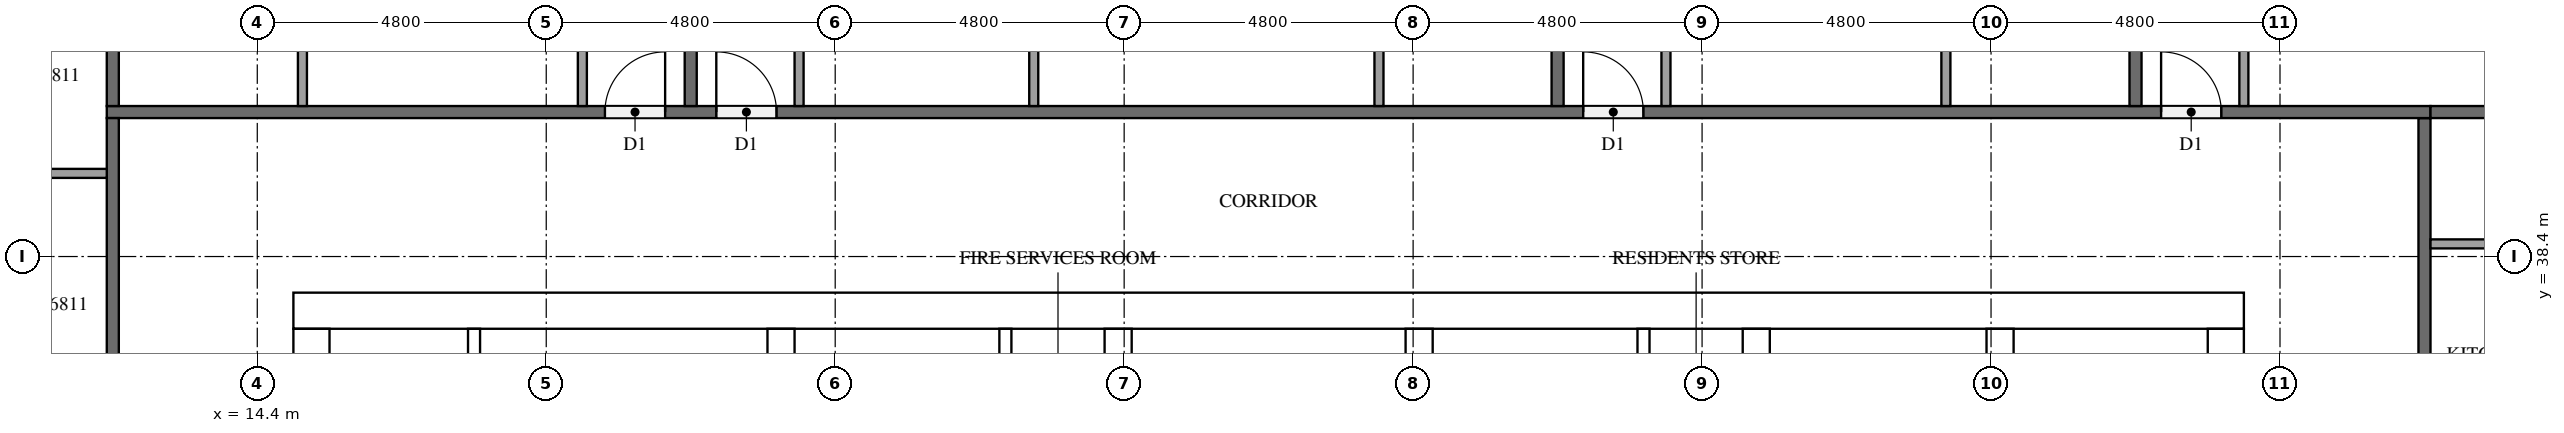
"""IFC4 building model, lengths in metres.
Left out: names, types, materials, properties, quantities, classifications, styles, units other than length and angle.
Written with IfcOpenShell. Run it as: python <this file> out.ifc"""

import sys

from ifc_helpers import new_model, si_unit, direction, frame, frame_2d, origin, place, context, subcontext, project, spatial, rectangle, extrude, element, fill, save


model = new_model("IFC4")
c1 = context("Model", 3, precision=1e-05, world=origin(), true_north=direction((0.0, 1.0)))
c2 = subcontext(c1, "Body", "Model", "MODEL_VIEW")
j1 = project(units=[si_unit("LENGTHUNIT", "METRE"), si_unit("PLANEANGLEUNIT", "RADIAN")], contexts=[c1])
p1 = place(None, origin())
s1 = spatial("IfcSite", under=j1, at=p1, CompositionType="ELEMENT")
p2 = place(p1, origin())
s2 = spatial("IfcBuilding", under=s1, at=p2, CompositionType="ELEMENT")
p3 = place(p2, frame((0.0, 0.0, 259.7)))
s3 = spatial("IfcBuildingStorey", under=s2, at=p3, CompositionType="ELEMENT", Elevation=259.7)
p4 = place(p3, frame((15.0, 37.5, 0.0), z_axis=(0.0, 0.0, 1.0), x_axis=(1.0, 0.0, 0.0)))
e1 = element("IfcWall", 1, at=p4, inside=s3, PredefinedType="SHEAR", context=c2, shape_type="SweptSolid", body=[
    extrude(rectangle(XDim=32.4, YDim=0.6, at=frame_2d((16.2, 0.0))), origin(), (0.0, 0.0, 1.0), 3.1),
])
p5 = place(p4, frame((15.3, 0.0, 0.0)))
e2 = element("IfcOpeningElement", 2, at=p5, cuts=e1, PredefinedType="OPENING", context=c2, shape_type="SweptSolid", body=[
    extrude(rectangle(XDim=1.8, YDim=2.1, at=frame_2d((0.9, 1.05))), frame((0.0, 0.31, 0.0), z_axis=(0.0, -1.0, 0.0), x_axis=(1.0, 0.0, 0.0)), (0.0, 0.0, 1.0), 0.62),
])
p6 = place(p4, frame((1.25, 0.0, 0.0)))
e3 = element("IfcOpeningElement", 3, at=p6, cuts=e1, PredefinedType="OPENING", context=c2, shape_type="SweptSolid", body=[
    extrude(rectangle(XDim=1.0, YDim=2.1, at=frame_2d((0.5, 1.05))), frame((0.0, 0.31, 0.0), z_axis=(0.0, -1.0, 0.0), x_axis=(1.0, 0.0, 0.0)), (0.0, 0.0, 1.0), 0.62),
])
p7 = place(p4, frame((4.988, 0.0, 0.0)))
e4 = element("IfcOpeningElement", 4, at=p7, cuts=e1, PredefinedType="OPENING", context=c2, shape_type="SweptSolid", body=[
    extrude(rectangle(XDim=1.0, YDim=2.1, at=frame_2d((0.5, 1.05))), frame((0.0, 0.31, 0.0), z_axis=(0.0, -1.0, 0.0), x_axis=(1.0, 0.0, 0.0)), (0.0, 0.0, 1.0), 0.62),
])
p8 = place(p3, frame((15.3, 15.6, 0.0), z_axis=(0.0, 0.0, 1.0), x_axis=(0.0, 1.0, 0.0)))
e5 = element("IfcWall", 5, at=p8, inside=s3, PredefinedType="SHEAR", context=c2, shape_type="SweptSolid", body=[
    extrude(rectangle(XDim=21.6, YDim=0.6, at=frame_2d((10.8, 0.0))), origin(), (0.0, 0.0, 1.0), 3.1),
])
p9 = place(p8, frame((5.16, 0.0, 0.0)))
e6 = element("IfcOpeningElement", 6, at=p9, cuts=e5, PredefinedType="OPENING", context=c2, shape_type="SweptSolid", body=[
    extrude(rectangle(XDim=1.2, YDim=2.1, at=frame_2d((0.6, 1.05))), frame((0.0, 0.31, 0.0), z_axis=(0.0, -1.0, 0.0), x_axis=(1.0, 0.0, 0.0)), (0.0, 0.0, 1.0), 0.62),
])
p10 = place(p3, frame((47.1, 15.6, 0.0), z_axis=(0.0, 0.0, 1.0), x_axis=(0.0, 1.0, 0.0)))
e7 = element("IfcWall", 7, at=p10, inside=s3, PredefinedType="SHEAR", context=c2, shape_type="SweptSolid", body=[
    extrude(rectangle(XDim=21.6, YDim=0.6, at=frame_2d((10.8, 0.0))), origin(), (0.0, 0.0, 1.0), 3.1),
])
p11 = place(p10, frame((10.5, 0.0, 0.0)))
e8 = element("IfcOpeningElement", 8, at=p11, cuts=e7, PredefinedType="OPENING", context=c2, shape_type="SweptSolid", body=[
    extrude(rectangle(XDim=1.2, YDim=2.1, at=frame_2d((0.6, 1.05))), frame((0.0, 0.31, 0.0), z_axis=(0.0, -1.0, 0.0), x_axis=(1.0, 0.0, 0.0)), (0.0, 0.0, 1.0), 0.62),
])
p12 = place(p3, frame((23.1, 15.6, 0.0), z_axis=(0.0, 0.0, 1.0), x_axis=(0.0, 1.0, 0.0)))
e9 = element("IfcWall", 9, at=p12, inside=s3, PredefinedType="SHEAR", context=c2, shape_type="SweptSolid", body=[
    extrude(rectangle(XDim=21.6, YDim=0.45, at=frame_2d((10.8, 0.0))), origin(), (0.0, 0.0, 1.0), 3.1),
])
p13 = place(p3, frame((39.3, 27.75, 0.0), z_axis=(0.0, 0.0, 1.0), x_axis=(0.0, 1.0, 0.0)))
e10 = element("IfcWall", 10, at=p13, inside=s3, PredefinedType="SHEAR", context=c2, shape_type="SweptSolid", body=[
    extrude(rectangle(XDim=9.45, YDim=0.45, at=frame_2d((4.725, 0.0))), origin(), (0.0, 0.0, 1.0), 3.1),
])
p14 = place(p3, frame((43.35, 27.75, 0.0), z_axis=(0.0, 0.0, 1.0), x_axis=(0.0, 1.0, 0.0)))
e11 = element("IfcWall", 11, at=p14, inside=s3, PredefinedType="SHEAR", context=c2, shape_type="SweptSolid", body=[
    extrude(rectangle(XDim=9.45, YDim=0.45, at=frame_2d((4.725, 0.0))), origin(), (0.0, 0.0, 1.0), 3.1),
])
p15 = place(p14, frame((7.65, 0.0, 0.0)))
e12 = element("IfcOpeningElement", 12, at=p15, cuts=e11, PredefinedType="OPENING", context=c2, shape_type="SweptSolid", body=[
    extrude(rectangle(XDim=1.2, YDim=2.1, at=frame_2d((0.6, 1.05))), frame((0.0, 0.235, 0.0), z_axis=(0.0, -1.0, 0.0), x_axis=(1.0, 0.0, 0.0)), (0.0, 0.0, 1.0), 0.47),
])
for number, where, z_axis, x_axis in (
    (13, (28.7, 33.775, 0.0), (0.0, 0.0, 1.0), (0.0, 1.0, 0.0)),
    (14, (33.7, 33.775, 0.0), (0.0, 0.0, 1.0), (0.0, 1.0, 0.0)),
):
    element("IfcWall", number, at=place(p3, frame(where, z_axis=z_axis, x_axis=x_axis)), inside=s3, PredefinedType="SHEAR", context=c2, shape_type="SweptSolid", body=[
        extrude(rectangle(XDim=3.425, YDim=0.45, at=frame_2d((1.712, 0.0))), origin(), (0.0, 0.0, 1.0), 3.1),
    ])
p16 = place(p3, frame((18.001, 31.475, 0.0), z_axis=(0.0, 0.0, 1.0), x_axis=(0.0, 1.0, 0.0)))
e15 = element("IfcWall", 15, at=p16, inside=s3, PredefinedType="PARTITIONING", context=c2, shape_type="SweptSolid", body=[
    extrude(rectangle(XDim=5.725, YDim=0.2, at=frame_2d((2.862, 0.0))), origin(), (0.0, 0.0, 1.0), 3.1),
])
for number, where, z_axis, x_axis in (
    (16, (26.827, 33.775, 0.0), (0.0, 0.0, 1.0), (0.0, 1.0, 0.0)),
    (17, (37.427, 33.775, 0.0), (0.0, 0.0, 1.0), (0.0, 1.0, 0.0)),
):
    element("IfcWall", number, at=place(p3, frame(where, z_axis=z_axis, x_axis=x_axis)), inside=s3, PredefinedType="PARTITIONING", context=c2, shape_type="SweptSolid", body=[
        extrude(rectangle(XDim=3.425, YDim=0.2, at=frame_2d((1.712, 0.0))), origin(), (0.0, 0.0, 1.0), 3.1),
    ])
p17 = place(p3, frame((50.4, 40.7, 0.0), z_axis=(0.0, 0.0, 1.0), x_axis=(0.0, -1.0, 0.0)))
e18 = element("IfcWall", 18, at=p17, inside=s3, PredefinedType="PARTITIONING", context=c2, shape_type="SweptSolid", body=[
    extrude(rectangle(XDim=28.6, YDim=0.2, at=frame_2d((14.3, 0.0))), origin(), (0.0, 0.0, 1.0), 3.1),
])
p18 = place(p17, frame((27.275, 0.0, 0.0)))
e19 = element("IfcOpeningElement", 19, at=p18, cuts=e18, PredefinedType="OPENING", context=c2, shape_type="SweptSolid", body=[
    extrude(rectangle(XDim=1.0, YDim=2.1, at=frame_2d((0.5, 1.05))), frame((0.0, 0.11, 0.0), z_axis=(0.0, -1.0, 0.0), x_axis=(1.0, 0.0, 0.0)), (0.0, 0.0, 1.0), 0.22),
])
p19 = place(p17, frame((7.525, 0.0, 0.0)))
e20 = element("IfcOpeningElement", 20, at=p19, cuts=e18, PredefinedType="OPENING", context=c2, shape_type="SweptSolid", body=[
    extrude(rectangle(XDim=1.0, YDim=2.1, at=frame_2d((0.5, 1.05))), frame((0.0, 0.11, 0.0), z_axis=(0.0, -1.0, 0.0), x_axis=(1.0, 0.0, 0.0)), (0.0, 0.0, 1.0), 0.22),
])
p20 = place(p17, frame((5.675, 0.0, 0.0)))
e21 = element("IfcOpeningElement", 21, at=p20, cuts=e18, PredefinedType="OPENING", context=c2, shape_type="SweptSolid", body=[
    extrude(rectangle(XDim=1.0, YDim=2.1, at=frame_2d((0.5, 1.05))), frame((0.0, 0.11, 0.0), z_axis=(0.0, -1.0, 0.0), x_axis=(1.0, 0.0, 0.0)), (0.0, 0.0, 1.0), 0.22),
])
p21 = place(p3, frame((11.9, 40.8, 0.0), z_axis=(0.0, 0.0, 1.0), x_axis=(1.0, 0.0, 0.0)))
e22 = element("IfcWall", 22, at=p21, inside=s3, PredefinedType="PARTITIONING", context=c2, shape_type="SweptSolid", body=[
    extrude(rectangle(XDim=38.6, YDim=0.2, at=frame_2d((19.3, 0.0))), origin(), (0.0, 0.0, 1.0), 3.1),
])
p22 = place(p21, frame((34.125, 0.0, 0.0)))
e23 = element("IfcOpeningElement", 23, at=p22, cuts=e22, PredefinedType="OPENING", context=c2, shape_type="SweptSolid", body=[
    extrude(rectangle(XDim=1.0, YDim=2.1, at=frame_2d((0.5, 1.05))), frame((0.0, 0.11, 0.0), z_axis=(0.0, -1.0, 0.0), x_axis=(1.0, 0.0, 0.0)), (0.0, 0.0, 1.0), 0.22),
])
p23 = place(p21, frame((24.525, 0.0, 0.0)))
e24 = element("IfcOpeningElement", 24, at=p23, cuts=e22, PredefinedType="OPENING", context=c2, shape_type="SweptSolid", body=[
    extrude(rectangle(XDim=1.0, YDim=2.1, at=frame_2d((0.5, 1.05))), frame((0.0, 0.11, 0.0), z_axis=(0.0, -1.0, 0.0), x_axis=(1.0, 0.0, 0.0)), (0.0, 0.0, 1.0), 0.22),
])
p24 = place(p21, frame((10.125, 0.0, 0.0)))
e25 = element("IfcOpeningElement", 25, at=p24, cuts=e22, PredefinedType="OPENING", context=c2, shape_type="SweptSolid", body=[
    extrude(rectangle(XDim=1.0, YDim=2.1, at=frame_2d((0.5, 1.05))), frame((0.0, 0.11, 0.0), z_axis=(0.0, -1.0, 0.0), x_axis=(1.0, 0.0, 0.0)), (0.0, 0.0, 1.0), 0.22),
])
p25 = place(p21, frame((8.275, 0.0, 0.0)))
e26 = element("IfcOpeningElement", 26, at=p25, cuts=e22, PredefinedType="OPENING", context=c2, shape_type="SweptSolid", body=[
    extrude(rectangle(XDim=1.0, YDim=2.1, at=frame_2d((0.5, 1.05))), frame((0.0, 0.11, 0.0), z_axis=(0.0, -1.0, 0.0), x_axis=(1.0, 0.0, 0.0)), (0.0, 0.0, 1.0), 0.22),
])
p26 = place(p3, frame((12.0, 12.1, 0.0), z_axis=(0.0, 0.0, 1.0), x_axis=(0.0, 1.0, 0.0)))
e27 = element("IfcWall", 27, at=p26, inside=s3, PredefinedType="PARTITIONING", context=c2, shape_type="SweptSolid", body=[
    extrude(rectangle(XDim=28.6, YDim=0.2, at=frame_2d((14.3, 0.0))), origin(), (0.0, 0.0, 1.0), 3.1),
])
p27 = place(p26, frame((21.875, 0.0, 0.0)))
e28 = element("IfcOpeningElement", 28, at=p27, cuts=e27, PredefinedType="OPENING", context=c2, shape_type="SweptSolid", body=[
    extrude(rectangle(XDim=1.1, YDim=2.1, at=frame_2d((0.55, 1.05))), frame((0.0, 0.11, 0.0), z_axis=(0.0, -1.0, 0.0), x_axis=(1.0, 0.0, 0.0)), (0.0, 0.0, 1.0), 0.22),
])
p28 = place(p26, frame((20.075, 0.0, 0.0)))
e29 = element("IfcOpeningElement", 29, at=p28, cuts=e27, PredefinedType="OPENING", context=c2, shape_type="SweptSolid", body=[
    extrude(rectangle(XDim=1.0, YDim=2.1, at=frame_2d((0.5, 1.05))), frame((0.0, 0.11, 0.0), z_axis=(0.0, -1.0, 0.0), x_axis=(1.0, 0.0, 0.0)), (0.0, 0.0, 1.0), 0.22),
])
p29 = place(p26, frame((5.675, 0.0, 0.0)))
e30 = element("IfcOpeningElement", 30, at=p29, cuts=e27, PredefinedType="OPENING", context=c2, shape_type="SweptSolid", body=[
    extrude(rectangle(XDim=1.0, YDim=2.1, at=frame_2d((0.5, 1.05))), frame((0.0, 0.11, 0.0), z_axis=(0.0, -1.0, 0.0), x_axis=(1.0, 0.0, 0.0)), (0.0, 0.0, 1.0), 0.22),
])
p30 = place(p3, frame((50.5, 40.8, 0.0), z_axis=(0.0, 0.0, 1.0), x_axis=(1.0, 0.0, 0.0)))
e31 = element("IfcWall", 31, at=p30, inside=s3, PredefinedType="PARTITIONING", context=c2, shape_type="SweptSolid", body=[
    extrude(rectangle(XDim=7.0, YDim=0.2, at=frame_2d((3.5, 0.0))), origin(), (0.0, 0.0, 1.0), 3.1),
])
for number, where, z_axis, x_axis in (
    (32, (45.6, 52.7, 0.0), (0.0, 0.0, 1.0), (0.0, -1.0, 0.0)),
    (33, (36.0, 52.7, 0.0), (0.0, 0.0, 1.0), (0.0, -1.0, 0.0)),
    (34, (21.6, 52.7, 0.0), (0.0, 0.0, 1.0), (0.0, -1.0, 0.0)),
    (35, (12.0, 52.7, 0.0), (0.0, 0.0, 1.0), (0.0, -1.0, 0.0)),
):
    element("IfcWall", number, at=place(p3, frame(where, z_axis=z_axis, x_axis=x_axis)), inside=s3, PredefinedType="PARTITIONING", context=c2, shape_type="SweptSolid", body=[
        extrude(rectangle(XDim=11.8, YDim=0.2, at=frame_2d((5.9, 0.0))), origin(), (0.0, 0.0, 1.0), 3.1),
    ])
p31 = place(p3, frame((50.5, 38.61, 0.0), z_axis=(0.0, 0.0, 1.0), x_axis=(1.0, 0.0, 0.0)))
e36 = element("IfcWall", 36, at=p31, inside=s3, PredefinedType="PARTITIONING", context=c2, shape_type="SweptSolid", body=[
    extrude(rectangle(XDim=2.075, YDim=0.15, at=frame_2d((1.038, 0.0))), origin(), (0.0, 0.0, 1.0), 3.1),
])
p32 = place(p3, frame((47.4, 40.9, 0.0), z_axis=(0.0, 0.0, 1.0), x_axis=(0.0, 1.0, 0.0)))
e37 = element("IfcWall", 37, at=p32, inside=s3, PredefinedType="PARTITIONING", context=c2, shape_type="SweptSolid", body=[
    extrude(rectangle(XDim=4.325, YDim=0.15, at=frame_2d((2.163, 0.0))), origin(), (0.0, 0.0, 1.0), 3.1),
])
p33 = place(p3, frame((42.45, 40.9, 0.0), z_axis=(0.0, 0.0, 1.0), x_axis=(0.0, 1.0, 0.0)))
e38 = element("IfcWall", 38, at=p33, inside=s3, PredefinedType="PARTITIONING", context=c2, shape_type="SweptSolid", body=[
    extrude(rectangle(XDim=3.575, YDim=0.15, at=frame_2d((1.788, 0.0))), origin(), (0.0, 0.0, 1.0), 3.1),
])
p34 = place(p3, frame((37.8, 40.9, 0.0), z_axis=(0.0, 0.0, 1.0), x_axis=(0.0, 1.0, 0.0)))
e39 = element("IfcWall", 39, at=p34, inside=s3, PredefinedType="PARTITIONING", context=c2, shape_type="SweptSolid", body=[
    extrude(rectangle(XDim=3.725, YDim=0.15, at=frame_2d((1.863, 0.0))), origin(), (0.0, 0.0, 1.0), 3.1),
])
for number, where, z_axis, x_axis in (
    (40, (27.298, 40.9, 0.0), (0.0, 0.0, 1.0), (0.0, 1.0, 0.0)),
    (41, (33.033, 40.9, 0.0), (0.0, 0.0, 1.0), (0.0, 1.0, 0.0)),
):
    element("IfcWall", number, at=place(p3, frame(where, z_axis=z_axis, x_axis=x_axis)), inside=s3, PredefinedType="PARTITIONING", context=c2, shape_type="SweptSolid", body=[
        extrude(rectangle(XDim=4.175, YDim=0.15, at=frame_2d((2.087, 0.0))), origin(), (0.0, 0.0, 1.0), 3.1),
    ])
p35 = place(p3, frame((23.4, 40.9, 0.0), z_axis=(0.0, 0.0, 1.0), x_axis=(0.0, 1.0, 0.0)))
e42 = element("IfcWall", 42, at=p35, inside=s3, PredefinedType="PARTITIONING", context=c2, shape_type="SweptSolid", body=[
    extrude(rectangle(XDim=4.325, YDim=0.15, at=frame_2d((2.163, 0.0))), origin(), (0.0, 0.0, 1.0), 3.1),
])
p36 = place(p3, frame((15.15, 40.9, 0.0), z_axis=(0.0, 0.0, 1.0), x_axis=(0.0, 1.0, 0.0)))
e43 = element("IfcWall", 43, at=p36, inside=s3, PredefinedType="PARTITIONING", context=c2, shape_type="SweptSolid", body=[
    extrude(rectangle(XDim=3.575, YDim=0.15, at=frame_2d((1.788, 0.0))), origin(), (0.0, 0.0, 1.0), 3.1),
])
p37 = place(p3, frame((19.8, 40.9, 0.0), z_axis=(0.0, 0.0, 1.0), x_axis=(0.0, 1.0, 0.0)))
e44 = element("IfcWall", 44, at=p37, inside=s3, PredefinedType="PARTITIONING", context=c2, shape_type="SweptSolid", body=[
    extrude(rectangle(XDim=3.725, YDim=0.15, at=frame_2d((1.863, 0.0))), origin(), (0.0, 0.0, 1.0), 3.1),
])
p38 = place(p3, frame((11.9, 39.781, 0.0), z_axis=(0.0, 0.0, 1.0), x_axis=(-1.0, 0.0, 0.0)))
e45 = element("IfcWall", 45, at=p38, inside=s3, PredefinedType="PARTITIONING", context=c2, shape_type="SweptSolid", body=[
    extrude(rectangle(XDim=3.125, YDim=0.15, at=frame_2d((1.562, 0.0))), origin(), (0.0, 0.0, 1.0), 3.1),
])
p39 = place(p5, origin())
e46 = element("IfcDoor", 46, at=p39, inside=s3, OperationType="DOUBLE_DOOR_SINGLE_SWING", PredefinedType="DOOR", context=c2, shape_type="SweptSolid", body=[
    extrude(rectangle(XDim=1.8, YDim=2.1, at=frame_2d((0.9, 1.05))), frame((0.0, 0.025, 0.0), z_axis=(0.0, -1.0, 0.0), x_axis=(1.0, 0.0, 0.0)), (0.0, 0.0, 1.0), 0.05),
])
fill(e2, e46)
p40 = place(p6, origin())
e47 = element("IfcDoor", 47, at=p40, inside=s3, OperationType="SINGLE_SWING_LEFT", PredefinedType="DOOR", context=c2, shape_type="SweptSolid", body=[
    extrude(rectangle(XDim=1.0, YDim=2.1, at=frame_2d((0.5, 1.05))), frame((0.0, 0.025, 0.0), z_axis=(0.0, -1.0, 0.0), x_axis=(1.0, 0.0, 0.0)), (0.0, 0.0, 1.0), 0.05),
])
fill(e3, e47)
p41 = place(p7, origin())
e48 = element("IfcDoor", 48, at=p41, inside=s3, OperationType="SINGLE_SWING_RIGHT", PredefinedType="DOOR", context=c2, shape_type="SweptSolid", body=[
    extrude(rectangle(XDim=1.0, YDim=2.1, at=frame_2d((0.5, 1.05))), frame((0.0, 0.025, 0.0), z_axis=(0.0, -1.0, 0.0), x_axis=(1.0, 0.0, 0.0)), (0.0, 0.0, 1.0), 0.05),
])
fill(e4, e48)
p42 = place(p22, origin())
e49 = element("IfcDoor", 49, at=p42, inside=s3, OperationType="SINGLE_SWING_LEFT", PredefinedType="DOOR", context=c2, shape_type="SweptSolid", body=[
    extrude(rectangle(XDim=1.0, YDim=2.1, at=frame_2d((0.5, 1.05))), frame((0.0, 0.025, 0.0), z_axis=(0.0, -1.0, 0.0), x_axis=(1.0, 0.0, 0.0)), (0.0, 0.0, 1.0), 0.05),
])
fill(e23, e49)
p43 = place(p23, origin())
e50 = element("IfcDoor", 50, at=p43, inside=s3, OperationType="SINGLE_SWING_LEFT", PredefinedType="DOOR", context=c2, shape_type="SweptSolid", body=[
    extrude(rectangle(XDim=1.0, YDim=2.1, at=frame_2d((0.5, 1.05))), frame((0.0, 0.025, 0.0), z_axis=(0.0, -1.0, 0.0), x_axis=(1.0, 0.0, 0.0)), (0.0, 0.0, 1.0), 0.05),
])
fill(e24, e50)
p44 = place(p24, origin())
e51 = element("IfcDoor", 51, at=p44, inside=s3, OperationType="SINGLE_SWING_LEFT", PredefinedType="DOOR", context=c2, shape_type="SweptSolid", body=[
    extrude(rectangle(XDim=1.0, YDim=2.1, at=frame_2d((0.5, 1.05))), frame((0.0, 0.025, 0.0), z_axis=(0.0, -1.0, 0.0), x_axis=(1.0, 0.0, 0.0)), (0.0, 0.0, 1.0), 0.05),
])
fill(e25, e51)
p45 = place(p25, origin())
e52 = element("IfcDoor", 52, at=p45, inside=s3, OperationType="SINGLE_SWING_RIGHT", PredefinedType="DOOR", context=c2, shape_type="SweptSolid", body=[
    extrude(rectangle(XDim=1.0, YDim=2.1, at=frame_2d((0.5, 1.05))), frame((0.0, 0.025, 0.0), z_axis=(0.0, -1.0, 0.0), x_axis=(1.0, 0.0, 0.0)), (0.0, 0.0, 1.0), 0.05),
])
fill(e26, e52)
save(model, sys.argv[1])
